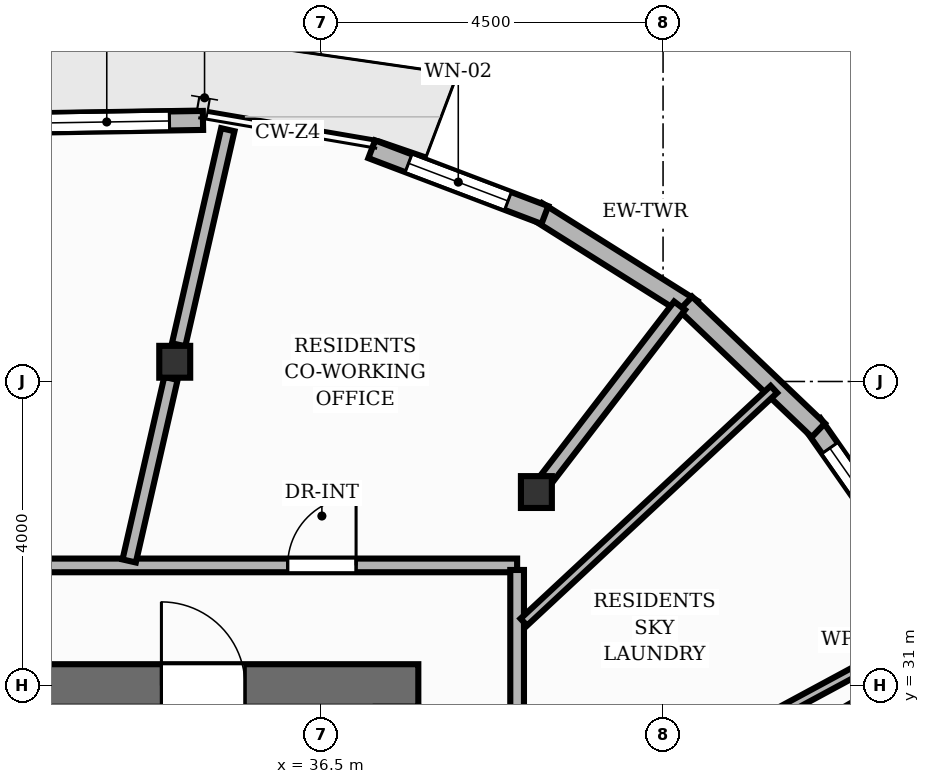
"""IFC4 building model, lengths in metres.
Left out: names, types, materials, properties, quantities, classifications, styles, units other than length and angle.
Written with IfcOpenShell. Run it as: python <this file> out.ifc"""

import sys

from ifc_helpers import new_model, si_unit, direction, frame, frame_2d, origin, origin_2d, place, context, subcontext, project, spatial, rectangle, i_section, extrude, element, fill, save


model = new_model("IFC4")
c1 = context("Model", 3, precision=1e-05, world=origin(), true_north=direction((0.0, 1.0)))
c2 = subcontext(c1, "Body", "Model", "MODEL_VIEW")
j1 = project(units=[si_unit("LENGTHUNIT", "METRE"), si_unit("PLANEANGLEUNIT", "RADIAN")], contexts=[c1])
p1 = place(None, origin())
s1 = spatial("IfcSite", under=j1, at=p1, CompositionType="ELEMENT")
p2 = place(p1, origin())
s2 = spatial("IfcBuilding", under=s1, at=p2, CompositionType="ELEMENT")
p3 = place(p2, frame((0.0, 0.0, 207.84)))
s3 = spatial("IfcBuildingStorey", under=s2, at=p3, CompositionType="ELEMENT", Elevation=207.84)
p4 = place(p3, frame((26.22, 31.0, 0.0), z_axis=(0.0, 0.0, 1.0), x_axis=(1.0, 0.0, 0.0)))
e1 = element("IfcWall", 1, at=p4, inside=s3, PredefinedType="SHEAR", context=c2, shape_type="SweptSolid", body=[
    extrude(rectangle(XDim=11.56, YDim=0.56, at=frame_2d((5.78, 0.0))), origin(), (0.0, 0.0, 1.0), 3.2),
])
p5 = place(p4, frame((8.18, 0.0, 0.0)))
e2 = element("IfcOpeningElement", 2, at=p5, cuts=e1, PredefinedType="OPENING", context=c2, shape_type="SweptSolid", body=[
    extrude(rectangle(XDim=1.1, YDim=2.15, at=frame_2d((0.55, 1.075))), frame((0.0, 0.29, 0.0), z_axis=(0.0, -1.0, 0.0), x_axis=(1.0, 0.0, 0.0)), (0.0, 0.0, 1.0), 0.58),
])
p6 = place(p4, frame((0.805, 0.0, 0.0)))
e3 = element("IfcOpeningElement", 3, at=p6, cuts=e1, PredefinedType="OPENING", context=c2, shape_type="SweptSolid", body=[
    extrude(rectangle(XDim=1.05, YDim=2.15, at=frame_2d((0.525, 1.075))), frame((0.0, 0.29, 0.0), z_axis=(0.0, -1.0, 0.0), x_axis=(1.0, 0.0, 0.0)), (0.0, 0.0, 1.0), 0.58),
])
p7 = place(p4, frame((2.555, 0.0, 0.0)))
e4 = element("IfcOpeningElement", 4, at=p7, cuts=e1, PredefinedType="OPENING", context=c2, shape_type="SweptSolid", body=[
    extrude(rectangle(XDim=1.05, YDim=2.15, at=frame_2d((0.525, 1.075))), frame((0.0, 0.29, 0.0), z_axis=(0.0, -1.0, 0.0), x_axis=(1.0, 0.0, 0.0)), (0.0, 0.0, 1.0), 0.58),
])
p8 = place(p4, frame((4.305, 0.0, 0.0)))
e5 = element("IfcOpeningElement", 5, at=p8, cuts=e1, PredefinedType="OPENING", context=c2, shape_type="SweptSolid", body=[
    extrude(rectangle(XDim=1.05, YDim=2.15, at=frame_2d((0.525, 1.075))), frame((0.0, 0.29, 0.0), z_axis=(0.0, -1.0, 0.0), x_axis=(1.0, 0.0, 0.0)), (0.0, 0.0, 1.0), 0.58),
])
for number, where, z_axis, x_axis in (
    (6, (39.333, 33.545, 0.0), (0.0, 0.0, 1.0), (1.0, 0.0, 0.0)),
    (7, (34.575, 35.26, 0.0), (0.0, 0.0, 1.0), (1.0, 0.0, 0.0)),
):
    element("IfcColumn", number, at=place(p3, frame(where, z_axis=z_axis, x_axis=x_axis)), inside=s3, PredefinedType="COLUMN", context=c2, shape_type="SweptSolid", body=[
        extrude(i_section(OverallWidth=0.407, OverallDepth=0.419, WebThickness=0.031, FlangeThickness=0.049, at=origin_2d()), origin(), (0.0, 0.0, 1.0), 3.2),
    ])
p9 = place(p3, frame((39.343, 37.242, 0.0), z_axis=(0.0, 0.0, 1.0), x_axis=(0.846426943671, -0.532504862914, 0.0)))
e8 = element("IfcWall", 8, at=p9, inside=s3, PredefinedType="SOLIDWALL", context=c2, shape_type="SweptSolid", body=[
    extrude(rectangle(XDim=2.415, YDim=0.25, at=frame_2d((1.208, 0.0))), origin(), (0.0, 0.0, 1.0), 2.96),
])
p10 = place(p3, frame((37.167, 38.055, 0.0), z_axis=(0.0, 0.0, 1.0), x_axis=(0.934909280934, -0.354886793813, 0.0)))
e9 = element("IfcWall", 9, at=p10, inside=s3, PredefinedType="SOLIDWALL", context=c2, shape_type="SweptSolid", body=[
    extrude(rectangle(XDim=2.437, YDim=0.25, at=frame_2d((1.218, 0.0))), origin(), (0.0, 0.0, 1.0), 2.96),
])
p11 = place(p10, frame((0.518, 0.0, 0.85)))
e10 = element("IfcOpeningElement", 10, at=p11, cuts=e9, PredefinedType="OPENING", context=c2, shape_type="SweptSolid", body=[
    extrude(rectangle(XDim=1.4, YDim=1.55, at=frame_2d((0.7, 0.775))), frame((0.0, 0.135, 0.0), z_axis=(0.0, -1.0, 0.0), x_axis=(1.0, 0.0, 0.0)), (0.0, 0.0, 1.0), 0.27),
])
p12 = place(p3, frame((32.415, 38.394, 0.0), z_axis=(0.0, 0.0, 1.0), x_axis=(0.999868796453, 0.016198453019, 0.0)))
e11 = element("IfcWall", 11, at=p12, inside=s3, PredefinedType="SOLIDWALL", context=c2, shape_type="SweptSolid", body=[
    extrude(rectangle(XDim=2.532, YDim=0.25, at=frame_2d((1.266, 0.0))), origin(), (0.0, 0.0, 1.0), 2.96),
])
p13 = place(p12, frame((0.441, 0.0, 0.85)))
e12 = element("IfcOpeningElement", 12, at=p13, cuts=e11, PredefinedType="OPENING", context=c2, shape_type="SweptSolid", body=[
    extrude(rectangle(XDim=1.65, YDim=1.55, at=frame_2d((0.825, 0.775))), frame((0.0, 0.135, 0.0), z_axis=(0.0, -1.0, 0.0), x_axis=(1.0, 0.0, 0.0)), (0.0, 0.0, 1.0), 0.27),
])
p14 = place(p3, frame((42.969, 34.446, 0.0), z_axis=(0.0, 0.0, 1.0), x_axis=(0.572877205554, -0.819641206478, 0.0)))
e13 = element("IfcWall", 13, at=p14, inside=s3, PredefinedType="SOLIDWALL", context=c2, shape_type="SweptSolid", body=[
    extrude(rectangle(XDim=2.437, YDim=0.25, at=frame_2d((1.218, 0.0))), origin(), (0.0, 0.0, 1.0), 2.96),
])
p15 = place(p14, frame((0.393, 0.0, 0.85)))
e14 = element("IfcOpeningElement", 14, at=p15, cuts=e13, PredefinedType="OPENING", context=c2, shape_type="SweptSolid", body=[
    extrude(rectangle(XDim=1.65, YDim=1.55, at=frame_2d((0.825, 0.775))), frame((0.0, 0.135, 0.0), z_axis=(0.0, -1.0, 0.0), x_axis=(1.0, 0.0, 0.0)), (0.0, 0.0, 1.0), 0.27),
])
p16 = place(p3, frame((41.296, 36.026, 0.0), z_axis=(0.0, 0.0, 1.0), x_axis=(0.723394563422, -0.690434867031, 0.0)))
e15 = element("IfcWall", 15, at=p16, inside=s3, PredefinedType="SOLIDWALL", context=c2, shape_type="SweptSolid", body=[
    extrude(rectangle(XDim=2.415, YDim=0.25, at=frame_2d((1.208, 0.0))), origin(), (0.0, 0.0, 1.0), 2.96),
])
p17 = place(p3, frame((43.174, 30.493, 0.0), z_axis=(0.0, 0.0, 1.0), x_axis=(0.864597744878, 0.502464664979, 0.0)))
e16 = element("IfcWall", 16, at=p17, inside=s3, PredefinedType="PARTITIONING", context=c2, shape_type="SweptSolid", body=[
    extrude(rectangle(XDim=1.825, YDim=0.18, at=frame_2d((0.913, 0.0))), origin(), (0.0, 0.0, 1.0), 2.403),
])
p18 = place(p3, frame((39.473, 33.727, 0.0), z_axis=(0.0, 0.0, 1.0), x_axis=(0.609211911664, 0.793007469502, 0.0)))
e17 = element("IfcWall", 17, at=p18, inside=s3, PredefinedType="PARTITIONING", context=c2, shape_type="SweptSolid", body=[
    extrude(rectangle(XDim=2.863, YDim=0.18, at=frame_2d((1.431, 0.0))), origin(), (0.0, 0.0, 1.0), 2.403),
])
p19 = place(p3, frame((34.626, 35.483, 0.0), z_axis=(0.0, 0.0, 1.0), x_axis=(0.22289331625, 0.974842843525, 0.0)))
e18 = element("IfcWall", 18, at=p19, inside=s3, PredefinedType="PARTITIONING", context=c2, shape_type="SweptSolid", body=[
    extrude(rectangle(XDim=2.903, YDim=0.18, at=frame_2d((1.451, 0.0))), origin(), (0.0, 0.0, 1.0), 2.403),
])
p20 = place(p3, frame((29.023, 32.58, 0.0), z_axis=(0.0, 0.0, 1.0), x_axis=(1.0, 0.0, 0.0)))
e19 = element("IfcWall", 19, at=p20, inside=s3, PredefinedType="PARTITIONING", context=c2, shape_type="SweptSolid", body=[
    extrude(rectangle(XDim=10.057, YDim=0.18, at=frame_2d((5.028, 0.0))), origin(), (0.0, 0.0, 1.0), 2.955),
])
p21 = place(p20, frame((7.038, 0.0, 0.0)))
e20 = element("IfcOpeningElement", 20, at=p21, cuts=e19, PredefinedType="OPENING", context=c2, shape_type="SweptSolid", body=[
    extrude(rectangle(XDim=0.9, YDim=2.1, at=frame_2d((0.45, 1.05))), frame((0.0, 0.1, 0.0), z_axis=(0.0, -1.0, 0.0), x_axis=(1.0, 0.0, 0.0)), (0.0, 0.0, 1.0), 0.2),
])
p22 = place(p3, frame((39.08, 32.52, 0.0), z_axis=(0.0, 0.0, 1.0), x_axis=(0.0, -1.0, 0.0)))
e21 = element("IfcWall", 21, at=p22, inside=s3, PredefinedType="PARTITIONING", context=c2, shape_type="SweptSolid", body=[
    extrude(rectangle(XDim=3.755, YDim=0.18, at=frame_2d((1.877, 0.0))), origin(), (0.0, 0.0, 1.0), 2.955),
])
p23 = place(p22, frame((1.798, 0.0, 0.0)))
e22 = element("IfcOpeningElement", 22, at=p23, cuts=e21, PredefinedType="OPENING", context=c2, shape_type="SweptSolid", body=[
    extrude(rectangle(XDim=0.9, YDim=2.1, at=frame_2d((0.45, 1.05))), frame((0.0, 0.1, 0.0), z_axis=(0.0, -1.0, 0.0), x_axis=(1.0, 0.0, 0.0)), (0.0, 0.0, 1.0), 0.2),
])
p24 = place(p3, frame((42.458, 34.896, 0.0), z_axis=(0.0, 0.0, 1.0), x_axis=(-0.731963088765, -0.681344286455, 0.0)))
e23 = element("IfcWall", 23, at=p24, inside=s3, PredefinedType="PARTITIONING", context=c2, shape_type="SweptSolid", body=[
    extrude(rectangle(XDim=4.495, YDim=0.125, at=frame_2d((2.248, 0.0))), origin(), (0.0, 0.0, 1.0), 2.955),
])
p25 = place(p3, frame((33.976, 32.638, 0.0), z_axis=(0.0, 0.0, 1.0), x_axis=(0.222927030412, 0.974835134323, 0.0)))
e24 = element("IfcWall", 24, at=p25, inside=s3, PredefinedType="PARTITIONING", context=c2, shape_type="SweptSolid", body=[
    extrude(rectangle(XDim=2.464, YDim=0.18, at=frame_2d((1.232, 0.0))), origin(), (0.0, 0.0, 1.0), 2.403),
])
p26 = place(p3, frame((44.632, 31.78, 0.0), z_axis=(0.0, 0.0, 1.0), x_axis=(-0.880108530436, -0.474772550442, 0.0)))
e25 = element("IfcWall", 25, at=p26, inside=s3, PredefinedType="PARTITIONING", context=c2, shape_type="SweptSolid", body=[
    extrude(rectangle(XDim=6.188, YDim=0.125, at=frame_2d((3.094, 0.0))), origin(), (0.0, 0.0, 1.0), 2.955),
])
p27 = place(p11, origin())
e26 = element("IfcWindow", 26, at=p27, inside=s3, PartitioningType="SINGLE_PANEL", PredefinedType="WINDOW", context=c2, shape_type="SweptSolid", body=[
    extrude(rectangle(XDim=1.4, YDim=1.55, at=frame_2d((0.7, 0.775))), frame((0.0, 0.03, 0.0), z_axis=(0.0, -1.0, 0.0), x_axis=(1.0, 0.0, 0.0)), (0.0, 0.0, 1.0), 0.06),
])
fill(e10, e26)
p28 = place(p13, origin())
e27 = element("IfcWindow", 27, at=p28, inside=s3, PartitioningType="SINGLE_PANEL", PredefinedType="WINDOW", context=c2, shape_type="SweptSolid", body=[
    extrude(rectangle(XDim=1.65, YDim=1.55, at=frame_2d((0.825, 0.775))), frame((0.0, 0.03, 0.0), z_axis=(0.0, -1.0, 0.0), x_axis=(1.0, 0.0, 0.0)), (0.0, 0.0, 1.0), 0.06),
])
fill(e12, e27)
p29 = place(p15, origin())
e28 = element("IfcWindow", 28, at=p29, inside=s3, PartitioningType="SINGLE_PANEL", PredefinedType="WINDOW", context=c2, shape_type="SweptSolid", body=[
    extrude(rectangle(XDim=1.65, YDim=1.55, at=frame_2d((0.825, 0.775))), frame((0.0, 0.03, 0.0), z_axis=(0.0, -1.0, 0.0), x_axis=(1.0, 0.0, 0.0)), (0.0, 0.0, 1.0), 0.06),
])
fill(e14, e28)
p30 = place(p5, origin())
e29 = element("IfcDoor", 29, at=p30, inside=s3, OperationType="SINGLE_SWING_LEFT", PredefinedType="DOOR", context=c2, shape_type="SweptSolid", body=[
    extrude(rectangle(XDim=1.1, YDim=2.15, at=frame_2d((0.55, 1.075))), frame((0.0, 0.025, 0.0), z_axis=(0.0, -1.0, 0.0), x_axis=(1.0, 0.0, 0.0)), (0.0, 0.0, 1.0), 0.05),
])
fill(e2, e29)
p31 = place(p21, origin())
e30 = element("IfcDoor", 30, at=p31, inside=s3, OperationType="SINGLE_SWING_RIGHT", PredefinedType="DOOR", context=c2, shape_type="SweptSolid", body=[
    extrude(rectangle(XDim=0.9, YDim=2.1, at=frame_2d((0.45, 1.05))), frame((0.0, 0.025, 0.0), z_axis=(0.0, -1.0, 0.0), x_axis=(1.0, 0.0, 0.0)), (0.0, 0.0, 1.0), 0.05),
])
fill(e20, e30)
save(model, sys.argv[1])
